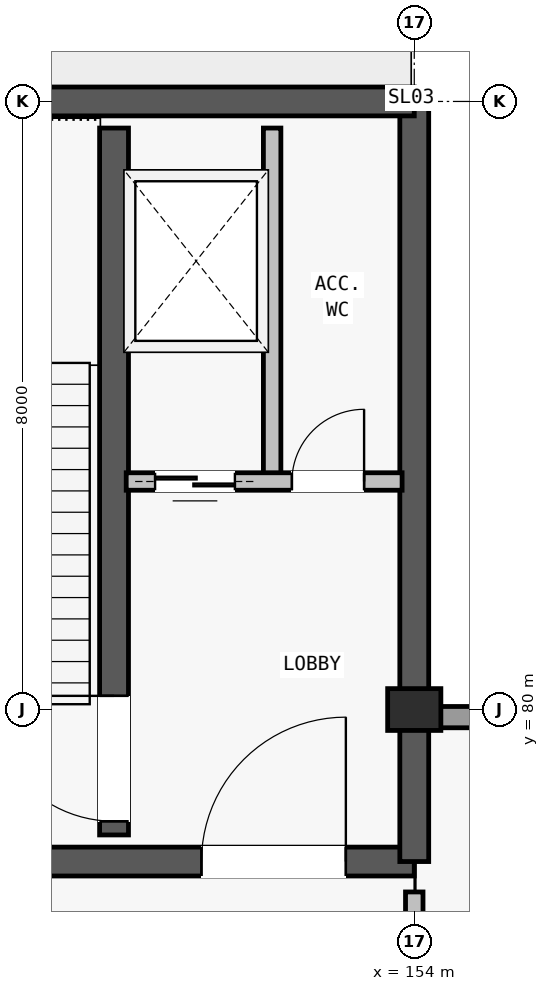
"""IFC4 building model, lengths in metres.
Left out: names, types, materials, properties, quantities, classifications, styles, units other than length and angle.
Written with IfcOpenShell. Run it as: python <this file> out.ifc"""

import sys

from ifc_helpers import new_model, si_unit, direction, frame, frame_2d, origin, origin_2d, place, context, subcontext, project, spatial, rectangle, extrude, element, fill, save


model = new_model("IFC4")
c1 = context("Model", 3, precision=1e-05, world=origin(), true_north=direction((0.0, 1.0)))
c2 = subcontext(c1, "Body", "Model", "MODEL_VIEW")
j1 = project(units=[si_unit("LENGTHUNIT", "METRE"), si_unit("PLANEANGLEUNIT", "RADIAN")], contexts=[c1])
p1 = place(None, origin())
s1 = spatial("IfcSite", under=j1, at=p1, CompositionType="ELEMENT")
p2 = place(p1, origin())
s2 = spatial("IfcBuilding", under=s1, at=p2, CompositionType="ELEMENT")
p3 = place(p2, origin())
s3 = spatial("IfcBuildingStorey", under=s2, at=p3, CompositionType="ELEMENT", Elevation=0.0)
p4 = place(p3, frame((154.0, 80.0, -0.9), z_axis=(0.0, 0.0, 1.0), x_axis=(1.0, 0.0, 0.0)))
e1 = element("IfcColumn", 1, at=p4, inside=s3, PredefinedType="COLUMN", context=c2, shape_type="SweptSolid", body=[
    extrude(rectangle(XDim=0.7, YDim=0.55, at=origin_2d()), origin(), (0.0, 0.0, 1.0), 6.5),
])
p5 = place(p3, frame((161.665, 79.9, 0.0), z_axis=(0.0, 0.0, 1.0), x_axis=(-1.0, 0.0, 0.0)))
e2 = element("IfcWall", 2, at=p5, inside=s3, PredefinedType="STANDARD", context=c2, shape_type="SweptSolid", body=[
    extrude(rectangle(XDim=7.525, YDim=0.28, at=frame_2d((3.763, 0.0))), origin(), (0.0, 0.0, 1.0), 4.2),
])
p6 = place(p5, frame((2.115, 0.0, 0.95)))
e3 = element("IfcOpeningElement", 3, at=p6, cuts=e2, PredefinedType="OPENING", context=c2, shape_type="SweptSolid", body=[
    extrude(rectangle(XDim=2.4, YDim=1.8, at=frame_2d((1.2, 0.9))), frame((0.0, 0.15, 0.0), z_axis=(0.0, -1.0, 0.0), x_axis=(1.0, 0.0, 0.0)), (0.0, 0.0, 1.0), 0.3),
])
p7 = place(p3, frame((146.0, 78.0, -0.9), z_axis=(0.0, 0.0, 1.0), x_axis=(1.0, 0.0, 0.0)))
e4 = element("IfcWall", 4, at=p7, inside=s3, PredefinedType="SHEAR", context=c2, shape_type="SweptSolid", body=[
    extrude(rectangle(XDim=8.0, YDim=0.38, at=frame_2d((4.0, 0.0))), origin(), (0.0, 0.0, 1.0), 6.22),
])
p8 = place(p7, frame((5.2, 0.0, 0.9)))
e5 = element("IfcOpeningElement", 5, at=p8, cuts=e4, PredefinedType="OPENING", context=c2, shape_type="SweptSolid", body=[
    extrude(rectangle(XDim=1.9, YDim=2.3, at=frame_2d((0.95, 1.15))), frame((0.0, 0.2, 0.0), z_axis=(0.0, -1.0, 0.0), x_axis=(1.0, 0.0, 0.0)), (0.0, 0.0, 1.0), 0.4),
])
p9 = place(p3, frame((154.0, 78.0, -0.9), z_axis=(0.0, 0.0, 1.0), x_axis=(0.0, 1.0, 0.0)))
e6 = element("IfcWall", 6, at=p9, inside=s3, PredefinedType="SHEAR", context=c2, shape_type="SweptSolid", body=[
    extrude(rectangle(XDim=10.0, YDim=0.38, at=frame_2d((5.0, 0.0))), origin(), (0.0, 0.0, 1.0), 6.22),
])
p10 = place(p3, frame((154.0, 88.0, -0.9), z_axis=(0.0, 0.0, 1.0), x_axis=(-1.0, 0.0, 0.0)))
e7 = element("IfcWall", 7, at=p10, inside=s3, PredefinedType="SHEAR", context=c2, shape_type="SweptSolid", body=[
    extrude(rectangle(XDim=8.0, YDim=0.38, at=frame_2d((4.0, 0.0))), origin(), (0.0, 0.0, 1.0), 6.22),
])
p11 = place(p3, frame((150.05, 78.35, -0.9), z_axis=(0.0, 0.0, 1.0), x_axis=(0.0, 1.0, 0.0)))
e8 = element("IfcWall", 8, at=p11, inside=s3, PredefinedType="SHEAR", context=c2, shape_type="SweptSolid", body=[
    extrude(rectangle(XDim=9.3, YDim=0.38, at=frame_2d((4.65, 0.0))), origin(), (0.0, 0.0, 1.0), 6.22),
])
p12 = place(p11, frame((0.18, 0.0, 0.9)))
e9 = element("IfcOpeningElement", 9, at=p12, cuts=e8, PredefinedType="OPENING", context=c2, shape_type="SweptSolid", body=[
    extrude(rectangle(XDim=1.65, YDim=2.2, at=frame_2d((0.825, 1.1))), frame((0.0, 0.2, 0.0), z_axis=(0.0, -1.0, 0.0), x_axis=(1.0, 0.0, 0.0)), (0.0, 0.0, 1.0), 0.4),
])
p13 = place(p3, frame((152.13, 83.0, 0.0), z_axis=(0.0, 0.0, 1.0), x_axis=(0.0, 1.0, 0.0)))
e10 = element("IfcWall", 10, at=p13, inside=s3, PredefinedType="PARTITIONING", context=c2, shape_type="SweptSolid", body=[
    extrude(rectangle(XDim=4.65, YDim=0.23, at=frame_2d((2.325, 0.0))), origin(), (0.0, 0.0, 1.0), 4.2),
])
p14 = place(p3, frame((150.21, 83.0, 0.0), z_axis=(0.0, 0.0, 1.0), x_axis=(1.0, 0.0, 0.0)))
e11 = element("IfcWall", 11, at=p14, inside=s3, PredefinedType="PARTITIONING", context=c2, shape_type="SweptSolid", body=[
    extrude(rectangle(XDim=3.63, YDim=0.23, at=frame_2d((1.815, 0.0))), origin(), (0.0, 0.0, 1.0), 4.2),
])
p15 = place(p14, frame((0.38, 0.0, 0.0)))
e12 = element("IfcOpeningElement", 12, at=p15, cuts=e11, PredefinedType="OPENING", context=c2, shape_type="SweptSolid", body=[
    extrude(rectangle(XDim=1.05, YDim=2.15, at=frame_2d((0.525, 1.075))), frame((0.0, 0.125, 0.0), z_axis=(0.0, -1.0, 0.0), x_axis=(1.0, 0.0, 0.0)), (0.0, 0.0, 1.0), 0.25),
])
p16 = place(p14, frame((2.18, 0.0, 0.0)))
e13 = element("IfcOpeningElement", 13, at=p16, cuts=e11, PredefinedType="OPENING", context=c2, shape_type="SweptSolid", body=[
    extrude(rectangle(XDim=0.95, YDim=2.1, at=frame_2d((0.475, 1.05))), frame((0.0, 0.125, 0.0), z_axis=(0.0, -1.0, 0.0), x_axis=(1.0, 0.0, 0.0)), (0.0, 0.0, 1.0), 0.25),
])
p17 = place(p3, frame((154.0, 41.0, 0.0), z_axis=(0.0, 0.0, 1.0), x_axis=(0.0, 1.0, 0.0)))
e14 = element("IfcWall", 14, at=p17, inside=s3, PredefinedType="PARTITIONING", context=c2, shape_type="SweptSolid", body=[
    extrude(rectangle(XDim=36.6, YDim=0.23, at=frame_2d((18.3, 0.0))), origin(), (0.0, 0.0, 1.0), 4.2),
])
p18 = place(p17, frame((10.5, 0.0, 0.0)))
e15 = element("IfcOpeningElement", 15, at=p18, cuts=e14, PredefinedType="OPENING", context=c2, shape_type="SweptSolid", body=[
    extrude(rectangle(XDim=1.2, YDim=2.2, at=frame_2d((0.6, 1.1))), frame((0.0, 0.125, 0.0), z_axis=(0.0, -1.0, 0.0), x_axis=(1.0, 0.0, 0.0)), (0.0, 0.0, 1.0), 0.25),
])
p19 = place(p17, frame((26.5, 0.0, 0.0)))
e16 = element("IfcOpeningElement", 16, at=p19, cuts=e14, PredefinedType="OPENING", context=c2, shape_type="SweptSolid", body=[
    extrude(rectangle(XDim=0.98, YDim=2.1, at=frame_2d((0.49, 1.05))), frame((0.0, 0.125, 0.0), z_axis=(0.0, -1.0, 0.0), x_axis=(1.0, 0.0, 0.0)), (0.0, 0.0, 1.0), 0.25),
])
p20 = place(p8, origin())
e17 = element("IfcDoor", 17, at=p20, inside=s3, OperationType="SINGLE_SWING_RIGHT", PredefinedType="DOOR", context=c2, shape_type="SweptSolid", body=[
    extrude(rectangle(XDim=1.9, YDim=2.3, at=frame_2d((0.95, 1.15))), frame((0.0, 0.025, 0.0), z_axis=(0.0, -1.0, 0.0), x_axis=(1.0, 0.0, 0.0)), (0.0, 0.0, 1.0), 0.05),
])
fill(e5, e17)
p21 = place(p12, origin())
e18 = element("IfcDoor", 18, at=p21, inside=s3, OperationType="SINGLE_SWING_RIGHT", PredefinedType="DOOR", context=c2, shape_type="SweptSolid", body=[
    extrude(rectangle(XDim=1.65, YDim=2.2, at=frame_2d((0.825, 1.1))), frame((0.0, 0.025, 0.0), z_axis=(0.0, -1.0, 0.0), x_axis=(1.0, 0.0, 0.0)), (0.0, 0.0, 1.0), 0.05),
])
fill(e9, e18)
p22 = place(p15, origin())
e19 = element("IfcDoor", 19, at=p22, inside=s3, OperationType="SLIDING_TO_LEFT", PredefinedType="DOOR", context=c2, shape_type="SweptSolid", body=[
    extrude(rectangle(XDim=1.05, YDim=2.15, at=frame_2d((0.525, 1.075))), frame((0.0, 0.025, 0.0), z_axis=(0.0, -1.0, 0.0), x_axis=(1.0, 0.0, 0.0)), (0.0, 0.0, 1.0), 0.05),
])
fill(e12, e19)
p23 = place(p16, origin())
e20 = element("IfcDoor", 20, at=p23, inside=s3, OperationType="SINGLE_SWING_RIGHT", PredefinedType="DOOR", context=c2, shape_type="SweptSolid", body=[
    extrude(rectangle(XDim=0.95, YDim=2.1, at=frame_2d((0.475, 1.05))), frame((0.0, 0.025, 0.0), z_axis=(0.0, -1.0, 0.0), x_axis=(1.0, 0.0, 0.0)), (0.0, 0.0, 1.0), 0.05),
])
fill(e13, e20)
save(model, sys.argv[1])
